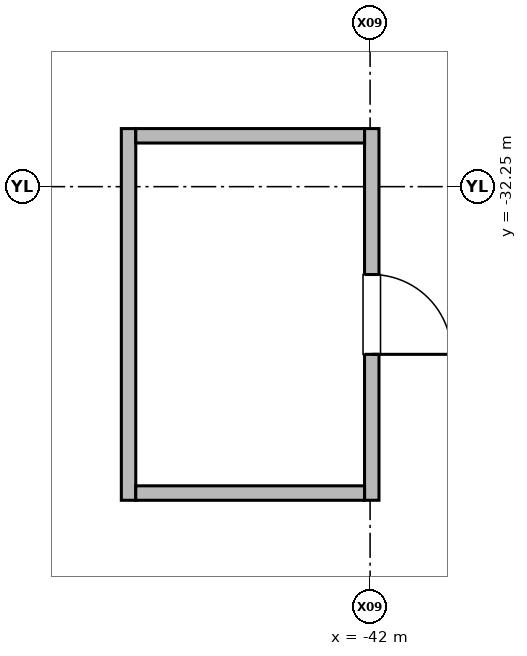
"""IFC4 building model, lengths in metres.
Left out: names, types, materials, properties, quantities, classifications, styles, units other than length and angle.
Written with IfcOpenShell. Run it as: python <this file> out.ifc"""

import sys

from ifc_helpers import new_model, si_unit, direction, frame, frame_2d, origin, place, context, subcontext, project, spatial, rectangle, extrude, element, fill, save


model = new_model("IFC4")
c1 = context("Model", 3, precision=1e-05, world=origin(), true_north=direction((0.0, 1.0)))
c2 = subcontext(c1, "Body", "Model", "MODEL_VIEW")
j1 = project(units=[si_unit("LENGTHUNIT", "METRE"), si_unit("PLANEANGLEUNIT", "RADIAN")], contexts=[c1])
p1 = place(None, origin())
s1 = spatial("IfcSite", under=j1, at=p1, CompositionType="ELEMENT")
p2 = place(p1, origin())
s2 = spatial("IfcBuilding", under=s1, at=p2, CompositionType="ELEMENT")
p3 = place(p2, frame((0.0, 0.0, -6.0)))
s3 = spatial("IfcBuildingStorey", under=s2, at=p3, CompositionType="ELEMENT", Elevation=-6.0)
p4 = place(p3, frame((-41.978, -31.486, 0.0), z_axis=(0.0, 0.0, 1.0), x_axis=(0.0, -1.0, 0.0)))
e1 = element("IfcWall", 1, at=p4, inside=s3, PredefinedType="PARTITIONING", context=c2, shape_type="SweptSolid", body=[
    extrude(rectangle(XDim=4.89, YDim=0.19, at=frame_2d((2.445, 0.0))), origin(), (0.0, 0.0, 1.0), 5.02),
])
p5 = place(p4, frame((1.92, 0.0, 0.0)))
e2 = element("IfcOpeningElement", 2, at=p5, cuts=e1, PredefinedType="OPENING", context=c2, shape_type="SweptSolid", body=[
    extrude(rectangle(XDim=1.05, YDim=2.25, at=frame_2d((0.525, 1.125))), frame((0.0, 0.105, 0.0), z_axis=(0.0, -1.0, 0.0), x_axis=(1.0, 0.0, 0.0)), (0.0, 0.0, 1.0), 0.21),
])
p6 = place(p3, frame((-45.178, -36.376, 0.0), z_axis=(0.0, 0.0, 1.0), x_axis=(0.0, 1.0, 0.0)))
e3 = element("IfcWall", 3, at=p6, inside=s3, PredefinedType="PARTITIONING", context=c2, shape_type="SweptSolid", body=[
    extrude(rectangle(XDim=4.89, YDim=0.19, at=frame_2d((2.445, 0.0))), origin(), (0.0, 0.0, 1.0), 5.02),
])
for number, where, z_axis, x_axis in (
    (4, (-45.083, -36.281, 0.0), (0.0, 0.0, 1.0), (1.0, 0.0, 0.0)),
    (5, (-45.083, -31.581, 0.0), (0.0, 0.0, 1.0), (1.0, 0.0, 0.0)),
):
    element("IfcWall", number, at=place(p3, frame(where, z_axis=z_axis, x_axis=x_axis)), inside=s3, PredefinedType="PARTITIONING", context=c2, shape_type="SweptSolid", body=[
        extrude(rectangle(XDim=3.01, YDim=0.19, at=frame_2d((1.505, 0.0))), origin(), (0.0, 0.0, 1.0), 5.02),
    ])
p7 = place(p5, origin())
e6 = element("IfcDoor", 6, at=p7, inside=s3, OperationType="SINGLE_SWING_RIGHT", PredefinedType="DOOR", context=c2, shape_type="SweptSolid", body=[
    extrude(rectangle(XDim=1.05, YDim=2.25, at=frame_2d((0.525, 1.125))), frame((0.0, 0.025, 0.0), z_axis=(0.0, -1.0, 0.0), x_axis=(1.0, 0.0, 0.0)), (0.0, 0.0, 1.0), 0.05),
])
fill(e2, e6)
save(model, sys.argv[1])
